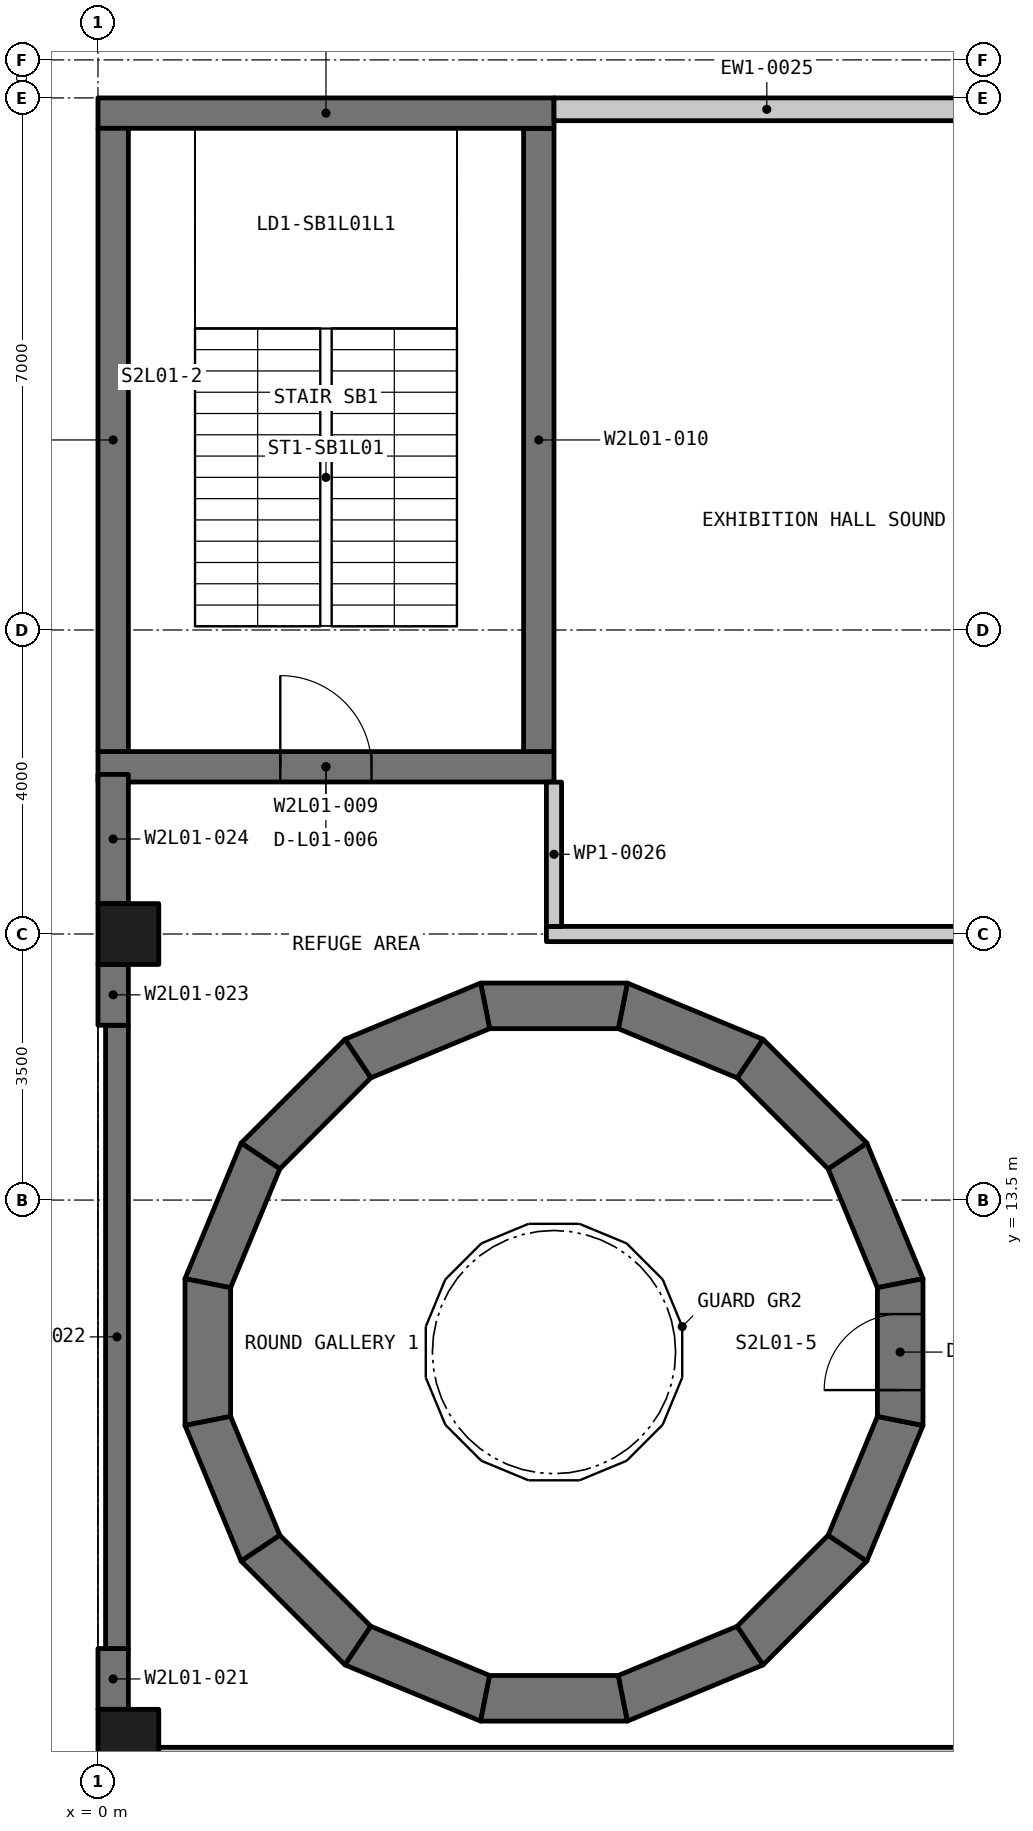
"""IFC4 building model, lengths in metres.
Left out: names, types, materials, properties, quantities, classifications, styles, units other than length and angle.
Written with IfcOpenShell. Run it as: python <this file> out.ifc"""

import sys

from ifc_helpers import new_model, si_unit, direction, frame, frame_2d, origin, origin_2d, place, context, subcontext, project, spatial, polyline, rectangle, outline, extrude, element, fill, save


model = new_model("IFC4")
c1 = context("Model", 3, precision=1e-05, world=origin(), true_north=direction((0.0, 1.0)))
c2 = subcontext(c1, "Body", "Model", "MODEL_VIEW")
j1 = project(units=[si_unit("LENGTHUNIT", "METRE"), si_unit("PLANEANGLEUNIT", "RADIAN")], contexts=[c1])
p1 = place(None, origin())
s1 = spatial("IfcSite", under=j1, at=p1, CompositionType="ELEMENT")
p2 = place(p1, origin())
s2 = spatial("IfcBuilding", under=s1, at=p2, CompositionType="ELEMENT")
p3 = place(p2, frame((0.0, 0.0, 6.0)))
s3 = spatial("IfcBuildingStorey", under=s2, at=p3, CompositionType="ELEMENT", Elevation=6.0)
for number, where, z_axis, x_axis in (
    (1, (0.4, 6.4, -0.3), (0.0, 0.0, 1.0), (1.0, 0.0, 0.0)),
    (2, (0.4, 17.0, -0.3), (0.0, 0.0, 1.0), (1.0, 0.0, 0.0)),
):
    element("IfcColumn", number, at=place(p3, frame(where, z_axis=z_axis, x_axis=x_axis)), inside=s3, PredefinedType="COLUMN", context=c2, shape_type="SweptSolid", body=[
        extrude(rectangle(XDim=0.8, YDim=0.8, at=origin_2d()), origin(), (0.0, 0.0, 1.0), 5.25),
    ])
p4 = place(p3, frame((10.578, 12.351, -0.3), z_axis=(0.0, 0.0, 1.0), x_axis=(-0.382630895081, 0.923901292417, 0.0)))
e3 = element("IfcWall", 3, at=p4, inside=s3, PredefinedType="SHEAR", context=c2, shape_type="SweptSolid", body=[
    extrude(outline(polyline([(0.0, -0.3), (1.931, -0.3), (1.812, 0.3), (0.119, 0.3), (0.0, -0.3)])), origin(), (0.0, 0.0, 1.0), 5.25),
])
p5 = place(p3, frame((9.904, 14.038, -0.3), z_axis=(0.0, 0.0, 1.0), x_axis=(-0.707106781187, 0.707106781187, 0.0)))
e4 = element("IfcWall", 4, at=p5, inside=s3, PredefinedType="SHEAR", context=c2, shape_type="SweptSolid", body=[
    extrude(outline(polyline([(0.0, -0.3), (1.931, -0.3), (1.812, 0.3), (0.119, 0.3), (0.0, -0.3)])), origin(), (0.0, 0.0, 1.0), 5.25),
])
p6 = place(p3, frame((8.635, 15.339, -0.3), z_axis=(0.0, 0.0, 1.0), x_axis=(-0.923901292417, 0.382630895081, 0.0)))
e5 = element("IfcWall", 5, at=p6, inside=s3, PredefinedType="SHEAR", context=c2, shape_type="SweptSolid", body=[
    extrude(outline(polyline([(0.0, -0.3), (1.931, -0.3), (1.812, 0.3), (0.119, 0.3), (0.0, -0.3)])), origin(), (0.0, 0.0, 1.0), 5.25),
])
p7 = place(p3, frame((6.966, 16.055, -0.3), z_axis=(0.0, 0.0, 1.0), x_axis=(-1.0, 0.0, 0.0)))
e6 = element("IfcWall", 6, at=p7, inside=s3, PredefinedType="SHEAR", context=c2, shape_type="SweptSolid", body=[
    extrude(outline(polyline([(-0.0, -0.3), (1.931, -0.3), (1.812, 0.3), (0.119, 0.3), (-0.0, -0.3)])), origin(), (0.0, 0.0, 1.0), 5.25),
])
p8 = place(p3, frame((5.149, 16.078, -0.3), z_axis=(0.0, 0.0, 1.0), x_axis=(-0.923901292417, -0.382630895081, 0.0)))
e7 = element("IfcWall", 7, at=p8, inside=s3, PredefinedType="SHEAR", context=c2, shape_type="SweptSolid", body=[
    extrude(outline(polyline([(0.0, -0.3), (1.931, -0.3), (1.812, 0.3), (0.119, 0.3), (0.0, -0.3)])), origin(), (0.0, 0.0, 1.0), 5.25),
])
p9 = place(p3, frame((3.462, 15.404, -0.3), z_axis=(0.0, 0.0, 1.0), x_axis=(-0.707106781187, -0.707106781187, 0.0)))
e8 = element("IfcWall", 8, at=p9, inside=s3, PredefinedType="SHEAR", context=c2, shape_type="SweptSolid", body=[
    extrude(outline(polyline([(0.0, -0.3), (1.931, -0.3), (1.812, 0.3), (0.119, 0.3), (0.0, -0.3)])), origin(), (0.0, 0.0, 1.0), 5.25),
])
p10 = place(p3, frame((2.161, 14.135, -0.3), z_axis=(0.0, 0.0, 1.0), x_axis=(-0.382630895081, -0.923901292417, 0.0)))
e9 = element("IfcWall", 9, at=p10, inside=s3, PredefinedType="SHEAR", context=c2, shape_type="SweptSolid", body=[
    extrude(outline(polyline([(0.0, -0.3), (1.931, -0.3), (1.812, 0.3), (0.119, 0.3), (0.0, -0.3)])), origin(), (0.0, 0.0, 1.0), 5.25),
])
p11 = place(p3, frame((1.445, 12.466, -0.3), z_axis=(0.0, 0.0, 1.0), x_axis=(0.0, -1.0, 0.0)))
e10 = element("IfcWall", 10, at=p11, inside=s3, PredefinedType="SHEAR", context=c2, shape_type="SweptSolid", body=[
    extrude(outline(polyline([(-0.0, -0.3), (1.931, -0.3), (1.812, 0.3), (0.119, 0.3), (-0.0, -0.3)])), origin(), (0.0, 0.0, 1.0), 5.25),
])
p12 = place(p3, frame((1.422, 10.649, -0.3), z_axis=(0.0, 0.0, 1.0), x_axis=(0.382630895081, -0.923901292417, 0.0)))
e11 = element("IfcWall", 11, at=p12, inside=s3, PredefinedType="SHEAR", context=c2, shape_type="SweptSolid", body=[
    extrude(outline(polyline([(0.0, -0.3), (1.931, -0.3), (1.812, 0.3), (0.119, 0.3), (0.0, -0.3)])), origin(), (0.0, 0.0, 1.0), 5.25),
])
p13 = place(p3, frame((2.096, 8.962, -0.3), z_axis=(0.0, 0.0, 1.0), x_axis=(0.707106781187, -0.707106781187, 0.0)))
e12 = element("IfcWall", 12, at=p13, inside=s3, PredefinedType="SHEAR", context=c2, shape_type="SweptSolid", body=[
    extrude(outline(polyline([(0.0, -0.3), (1.931, -0.3), (1.812, 0.3), (0.119, 0.3), (0.0, -0.3)])), origin(), (0.0, 0.0, 1.0), 5.25),
])
p14 = place(p3, frame((3.365, 7.661, -0.3), z_axis=(0.0, 0.0, 1.0), x_axis=(0.923901292417, -0.382630895081, 0.0)))
e13 = element("IfcWall", 13, at=p14, inside=s3, PredefinedType="SHEAR", context=c2, shape_type="SweptSolid", body=[
    extrude(outline(polyline([(0.0, -0.3), (1.931, -0.3), (1.812, 0.3), (0.119, 0.3), (0.0, -0.3)])), origin(), (0.0, 0.0, 1.0), 5.25),
])
p15 = place(p3, frame((5.034, 6.945, -0.3), z_axis=(0.0, 0.0, 1.0), x_axis=(1.0, 0.0, 0.0)))
e14 = element("IfcWall", 14, at=p15, inside=s3, PredefinedType="SHEAR", context=c2, shape_type="SweptSolid", body=[
    extrude(outline(polyline([(-0.0, -0.3), (1.931, -0.3), (1.812, 0.3), (0.119, 0.3), (-0.0, -0.3)])), origin(), (0.0, 0.0, 1.0), 5.25),
])
p16 = place(p3, frame((6.851, 6.922, -0.3), z_axis=(0.0, 0.0, 1.0), x_axis=(0.923901292417, 0.382630895081, 0.0)))
e15 = element("IfcWall", 15, at=p16, inside=s3, PredefinedType="SHEAR", context=c2, shape_type="SweptSolid", body=[
    extrude(outline(polyline([(0.0, -0.3), (1.931, -0.3), (1.812, 0.3), (0.119, 0.3), (0.0, -0.3)])), origin(), (0.0, 0.0, 1.0), 5.25),
])
p17 = place(p3, frame((8.538, 7.596, -0.3), z_axis=(0.0, 0.0, 1.0), x_axis=(0.707106781187, 0.707106781187, 0.0)))
e16 = element("IfcWall", 16, at=p17, inside=s3, PredefinedType="SHEAR", context=c2, shape_type="SweptSolid", body=[
    extrude(outline(polyline([(0.0, -0.3), (1.931, -0.3), (1.812, 0.3), (0.119, 0.3), (0.0, -0.3)])), origin(), (0.0, 0.0, 1.0), 5.25),
])
p18 = place(p3, frame((9.839, 8.865, -0.3), z_axis=(0.0, 0.0, 1.0), x_axis=(0.382630895081, 0.923901292417, 0.0)))
e17 = element("IfcWall", 17, at=p18, inside=s3, PredefinedType="SHEAR", context=c2, shape_type="SweptSolid", body=[
    extrude(outline(polyline([(0.0, -0.3), (1.931, -0.3), (1.812, 0.3), (0.119, 0.3), (0.0, -0.3)])), origin(), (0.0, 0.0, 1.0), 5.25),
])
p19 = place(p3, frame((10.555, 10.534, -0.3), z_axis=(0.0, 0.0, 1.0), x_axis=(0.0, 1.0, 0.0)))
e18 = element("IfcWall", 18, at=p19, inside=s3, PredefinedType="SHEAR", context=c2, shape_type="SweptSolid", body=[
    extrude(outline(polyline([(-0.0, -0.3), (1.931, -0.3), (1.812, 0.3), (0.119, 0.3), (-0.0, -0.3)])), origin(), (0.0, 0.0, 1.0), 5.25),
])
p20 = place(p19, frame((0.466, 0.0, 0.3)))
e19 = element("IfcOpeningElement", 19, at=p20, cuts=e18, PredefinedType="OPENING", context=c2, shape_type="SweptSolid", body=[
    extrude(rectangle(XDim=1.0, YDim=2.2, at=frame_2d((0.5, 1.1))), frame((0.0, 0.31, 0.0), z_axis=(0.0, -1.0, 0.0), x_axis=(1.0, 0.0, 0.0)), (0.0, 0.0, 1.0), 0.62),
])
p21 = place(p3, frame((0.0, 19.2, -0.3), z_axis=(0.0, 0.0, 1.0), x_axis=(1.0, 0.0, 0.0)))
e20 = element("IfcWall", 20, at=p21, inside=s3, PredefinedType="SHEAR", context=c2, shape_type="SweptSolid", body=[
    extrude(rectangle(XDim=6.0, YDim=0.4, at=frame_2d((3.0, 0.0))), origin(), (0.0, 0.0, 1.0), 5.25),
])
p22 = place(p21, frame((2.399, 0.0, 0.3)))
e21 = element("IfcOpeningElement", 21, at=p22, cuts=e20, PredefinedType="OPENING", context=c2, shape_type="SweptSolid", body=[
    extrude(rectangle(XDim=1.2, YDim=2.2, at=frame_2d((0.6, 1.1))), frame((0.0, 0.21, 0.0), z_axis=(0.0, -1.0, 0.0), x_axis=(1.0, 0.0, 0.0)), (0.0, 0.0, 1.0), 0.42),
])
p23 = place(p3, frame((5.8, 19.4, -0.3), z_axis=(0.0, 0.0, 1.0), x_axis=(0.0, 1.0, 0.0)))
e22 = element("IfcWall", 22, at=p23, inside=s3, PredefinedType="SHEAR", context=c2, shape_type="SweptSolid", body=[
    extrude(rectangle(XDim=8.2, YDim=0.4, at=frame_2d((4.1, 0.0))), origin(), (0.0, 0.0, 1.0), 5.25),
])
p24 = place(p3, frame((0.0, 27.8, -0.3), z_axis=(0.0, 0.0, 1.0), x_axis=(1.0, 0.0, 0.0)))
e23 = element("IfcWall", 23, at=p24, inside=s3, PredefinedType="SHEAR", context=c2, shape_type="SweptSolid", body=[
    extrude(rectangle(XDim=6.0, YDim=0.4, at=frame_2d((3.0, 0.0))), origin(), (0.0, 0.0, 1.0), 5.25),
])
p25 = place(p3, frame((0.2, 19.4, -0.3), z_axis=(0.0, 0.0, 1.0), x_axis=(0.0, 1.0, 0.0)))
e24 = element("IfcWall", 24, at=p25, inside=s3, PredefinedType="SHEAR", context=c2, shape_type="SweptSolid", body=[
    extrude(rectangle(XDim=8.2, YDim=0.4, at=frame_2d((4.1, 0.0))), origin(), (0.0, 0.0, 1.0), 5.25),
])
p26 = place(p3, frame((0.2, 6.8, -0.3), z_axis=(0.0, 0.0, 1.0), x_axis=(0.0, 1.0, 0.0)))
e25 = element("IfcWall", 25, at=p26, inside=s3, PredefinedType="SOLIDWALL", context=c2, shape_type="SweptSolid", body=[
    extrude(rectangle(XDim=0.8, YDim=0.4, at=frame_2d((0.4, 0.0))), origin(), (0.0, 0.0, 1.0), 5.25),
])
p27 = place(p3, frame((0.25, 7.6, -0.3), z_axis=(0.0, 0.0, 1.0), x_axis=(0.0, 1.0, 0.0)))
e26 = element("IfcWall", 26, at=p27, inside=s3, PredefinedType="SOLIDWALL", context=c2, shape_type="SweptSolid", body=[
    extrude(rectangle(XDim=8.2, YDim=0.3, at=frame_2d((4.1, 0.0))), origin(), (0.0, 0.0, 1.0), 5.25),
])
p28 = place(p3, frame((0.2, 15.8, -0.3), z_axis=(0.0, 0.0, 1.0), x_axis=(0.0, 1.0, 0.0)))
e27 = element("IfcWall", 27, at=p28, inside=s3, PredefinedType="SOLIDWALL", context=c2, shape_type="SweptSolid", body=[
    extrude(rectangle(XDim=0.8, YDim=0.4, at=frame_2d((0.4, 0.0))), origin(), (0.0, 0.0, 1.0), 5.25),
])
p29 = place(p3, frame((0.2, 17.4, -0.3), z_axis=(0.0, 0.0, 1.0), x_axis=(0.0, 1.0, 0.0)))
e28 = element("IfcWall", 28, at=p29, inside=s3, PredefinedType="SOLIDWALL", context=c2, shape_type="SweptSolid", body=[
    extrude(rectangle(XDim=1.7, YDim=0.4, at=frame_2d((0.85, 0.0))), origin(), (0.0, 0.0, 1.0), 5.25),
])
p30 = place(p3, frame((11.6, 6.15, 0.0), z_axis=(0.0, 0.0, 1.0), x_axis=(-1.0, 0.0, 0.0)))
e29 = element("IfcWall", 29, at=p30, inside=s3, PredefinedType="SOLIDWALL", context=c2, shape_type="SweptSolid", body=[
    extrude(rectangle(XDim=10.8, YDim=0.3, at=frame_2d((5.4, 0.0))), origin(), (0.0, 0.0, 1.0), 4.05),
])
p31 = place(p3, frame((6.0, 27.85, 0.0), z_axis=(0.0, 0.0, 1.0), x_axis=(1.0, 0.0, 0.0)))
e30 = element("IfcWall", 30, at=p31, inside=s3, PredefinedType="SOLIDWALL", context=c2, shape_type="SweptSolid", body=[
    extrude(rectangle(XDim=5.6, YDim=0.3, at=frame_2d((2.8, 0.0))), origin(), (0.0, 0.0, 1.0), 4.05),
])
p32 = place(p3, frame((65.9, 17.0, 0.0), z_axis=(0.0, 0.0, 1.0), x_axis=(-1.0, 0.0, 0.0)))
e31 = element("IfcWall", 31, at=p32, inside=s3, PredefinedType="PARTITIONING", context=c2, shape_type="SweptSolid", body=[
    extrude(rectangle(XDim=60.0, YDim=0.2, at=frame_2d((30.0, 0.0))), origin(), (0.0, 0.0, 1.0), 4.05),
])
p33 = place(p32, frame((50.75, 0.0, 0.0)))
e32 = element("IfcOpeningElement", 32, at=p33, cuts=e31, PredefinedType="OPENING", context=c2, shape_type="SweptSolid", body=[
    extrude(rectangle(XDim=1.5, YDim=2.1, at=frame_2d((0.75, 1.05))), frame((0.0, 0.11, 0.0), z_axis=(0.0, -1.0, 0.0), x_axis=(1.0, 0.0, 0.0)), (0.0, 0.0, 1.0), 0.22),
])
p34 = place(p32, frame((37.401, 0.0, 0.0)))
e33 = element("IfcOpeningElement", 33, at=p34, cuts=e31, PredefinedType="OPENING", context=c2, shape_type="SweptSolid", body=[
    extrude(rectangle(XDim=2.0, YDim=2.1, at=frame_2d((1.0, 1.05))), frame((0.0, 0.11, 0.0), z_axis=(0.0, -1.0, 0.0), x_axis=(1.0, 0.0, 0.0)), (0.0, 0.0, 1.0), 0.22),
])
p35 = place(p32, frame((11.15, 0.0, 0.0)))
e34 = element("IfcOpeningElement", 34, at=p35, cuts=e31, PredefinedType="OPENING", context=c2, shape_type="SweptSolid", body=[
    extrude(rectangle(XDim=1.5, YDim=2.1, at=frame_2d((0.75, 1.05))), frame((0.0, 0.11, 0.0), z_axis=(0.0, -1.0, 0.0), x_axis=(1.0, 0.0, 0.0)), (0.0, 0.0, 1.0), 0.22),
])
p36 = place(p32, frame((2.251, 0.0, 0.0)))
e35 = element("IfcOpeningElement", 35, at=p36, cuts=e31, PredefinedType="OPENING", context=c2, shape_type="SweptSolid", body=[
    extrude(rectangle(XDim=2.0, YDim=2.1, at=frame_2d((1.0, 1.05))), frame((0.0, 0.11, 0.0), z_axis=(0.0, -1.0, 0.0), x_axis=(1.0, 0.0, 0.0)), (0.0, 0.0, 1.0), 0.22),
])
p37 = place(p3, frame((6.0, 17.1, 0.0), z_axis=(0.0, 0.0, 1.0), x_axis=(0.0, 1.0, 0.0)))
e36 = element("IfcWall", 36, at=p37, inside=s3, PredefinedType="PARTITIONING", context=c2, shape_type="SweptSolid", body=[
    extrude(rectangle(XDim=1.898, YDim=0.2, at=frame_2d((0.949, 0.0))), origin(), (0.0, 0.0, 1.0), 4.05),
])
p38 = place(p22, origin())
e37 = element("IfcDoor", 37, at=p38, inside=s3, OperationType="SINGLE_SWING_RIGHT", PredefinedType="DOOR", context=c2, shape_type="SweptSolid", body=[
    extrude(rectangle(XDim=1.2, YDim=2.2, at=frame_2d((0.6, 1.1))), frame((0.0, 0.025, 0.0), z_axis=(0.0, -1.0, 0.0), x_axis=(1.0, 0.0, 0.0)), (0.0, 0.0, 1.0), 0.05),
])
fill(e21, e37)
p39 = place(p20, origin())
e38 = element("IfcDoor", 38, at=p39, inside=s3, OperationType="SINGLE_SWING_LEFT", PredefinedType="DOOR", context=c2, shape_type="SweptSolid", body=[
    extrude(rectangle(XDim=1.0, YDim=2.2, at=frame_2d((0.5, 1.1))), frame((0.0, 0.025, 0.0), z_axis=(0.0, -1.0, 0.0), x_axis=(1.0, 0.0, 0.0)), (0.0, 0.0, 1.0), 0.05),
])
fill(e19, e38)
save(model, sys.argv[1])
